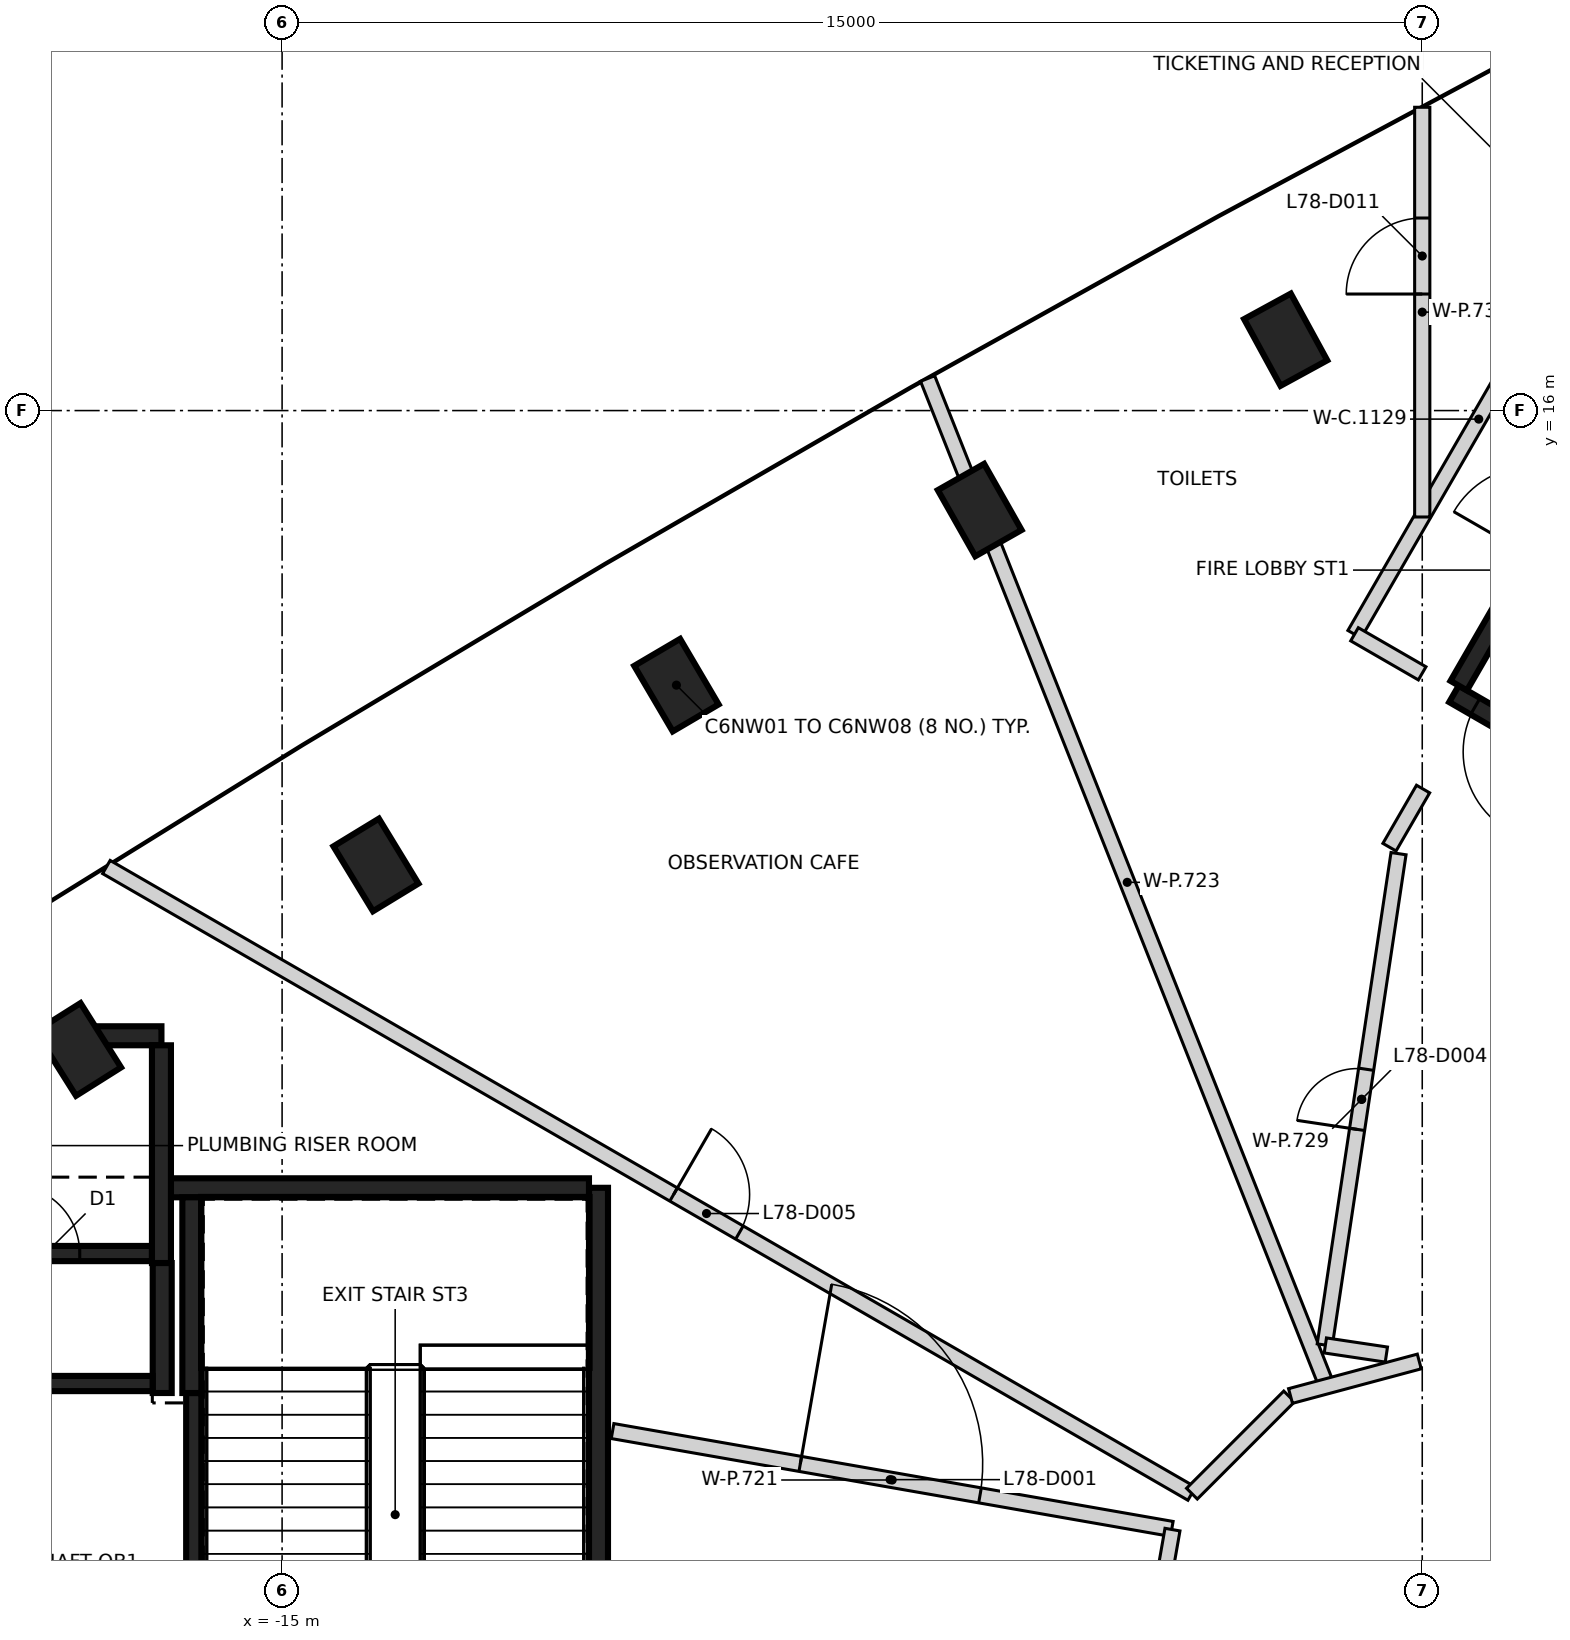
"""IFC4 building model, lengths in metres.
Left out: names, types, materials, properties, quantities, classifications, styles, units other than length and angle.
Written with IfcOpenShell. Run it as: python <this file> out.ifc"""

import sys

from ifc_helpers import new_model, si_unit, direction, frame, frame_2d, origin, origin_2d, place, context, subcontext, project, spatial, rectangle, extrude, element, fill, save


model = new_model("IFC4")
c1 = context("Model", 3, precision=1e-05, world=origin(), true_north=direction((0.0, 1.0)))
c2 = subcontext(c1, "Body", "Model", "MODEL_VIEW")
j1 = project(units=[si_unit("LENGTHUNIT", "METRE"), si_unit("PLANEANGLEUNIT", "RADIAN")], contexts=[c1])
p1 = place(None, origin())
s1 = spatial("IfcSite", under=j1, at=p1, CompositionType="ELEMENT")
p2 = place(p1, origin())
s2 = spatial("IfcBuilding", under=s1, at=p2, CompositionType="ELEMENT")
p3 = place(p2, frame((0.0, 0.0, 312.6)))
s3 = spatial("IfcBuildingStorey", under=s2, at=p3, CompositionType="ELEMENT", Elevation=312.6)
for number, where, z_axis, x_axis in (
    (1, (-1.797, 16.932, -0.35), (0.0, 0.0, 1.0), (-0.479, 0.878, 0.0)),
    (2, (-5.822, 14.691, -0.35), (0.0, 0.0, 1.0), (-0.493, 0.87, 0.0)),
    (3, (-9.812, 12.388, -0.35), (0.0, 0.0, 1.0), (-0.507, 0.862, 0.0)),
    (4, (-13.765, 10.022, -0.35), (0.0, 0.0, 1.0), (-0.52, 0.854, 0.0)),
    (5, (-17.681, 7.595, -0.35), (0.0, 0.0, 1.0), (-0.533, 0.846, 0.0)),
):
    element("IfcColumn", number, at=place(p3, frame(where, z_axis=z_axis, x_axis=x_axis)), inside=s3, PredefinedType="COLUMN", context=c2, shape_type="SweptSolid", body=[
        extrude(rectangle(XDim=1.0, YDim=0.7, at=origin_2d()), origin(), (0.0, 0.0, 1.0), 8.1),
    ])
p4 = place(p3, frame((-10.837, 5.775, 0.0), z_axis=(0.0, 0.0, 1.0), x_axis=(0.0, -1.0, 0.0)))
e6 = element("IfcWall", 6, at=p4, inside=s3, PredefinedType="SHEAR", context=c2, shape_type="SweptSolid", body=[
    extrude(rectangle(XDim=11.55, YDim=0.25, at=frame_2d((5.775, 0.0))), origin(), (0.0, 0.0, 1.0), 7.75),
])
p5 = place(p4, frame((10.025, 0.0, 0.0)))
e7 = element("IfcOpeningElement", 7, at=p5, cuts=e6, PredefinedType="OPENING", context=c2, shape_type="SweptSolid", body=[
    extrude(rectangle(XDim=1.2, YDim=2.1, at=frame_2d((0.6, 1.05))), frame((0.0, 0.135, 0.0), z_axis=(0.0, -1.0, 0.0), x_axis=(1.0, 0.0, 0.0)), (0.0, 0.0, 1.0), 0.27),
])
p6 = place(p4, frame((8.725, 0.0, 0.0)))
e8 = element("IfcOpeningElement", 8, at=p6, cuts=e6, PredefinedType="OPENING", context=c2, shape_type="SweptSolid", body=[
    extrude(rectangle(XDim=1.2, YDim=2.1, at=frame_2d((0.6, 1.05))), frame((0.0, 0.135, 0.0), z_axis=(0.0, -1.0, 0.0), x_axis=(1.0, 0.0, 0.0)), (0.0, 0.0, 1.0), 0.27),
])
p7 = place(p3, frame((-16.472, 5.775, 0.0), z_axis=(0.0, 0.0, 1.0), x_axis=(1.0, 0.0, 0.0)))
e9 = element("IfcWall", 9, at=p7, inside=s3, PredefinedType="SHEAR", context=c2, shape_type="SweptSolid", body=[
    extrude(rectangle(XDim=5.51, YDim=0.25, at=frame_2d((2.755, 0.0))), origin(), (0.0, 0.0, 1.0), 7.75),
])
p8 = place(p3, frame((-19.637, 7.775, 0.0), z_axis=(0.0, 0.0, 1.0), x_axis=(1.0, 0.0, 0.0)))
e10 = element("IfcWall", 10, at=p8, inside=s3, PredefinedType="SHEAR", context=c2, shape_type="SweptSolid", body=[
    extrude(rectangle(XDim=3.05, YDim=0.25, at=frame_2d((1.525, 0.0))), origin(), (0.0, 0.0, 1.0), 7.75),
])
p9 = place(p3, frame((-16.587, 7.65, 0.0), z_axis=(0.0, 0.0, 1.0), x_axis=(0.0, -1.0, 0.0)))
e11 = element("IfcWall", 11, at=p9, inside=s3, PredefinedType="SHEAR", context=c2, shape_type="SweptSolid", body=[
    extrude(rectangle(XDim=2.865, YDim=0.25, at=frame_2d((1.432, 0.0))), origin(), (0.0, 0.0, 1.0), 7.75),
])
p10 = place(p3, frame((-16.187, 3.075, 0.0), z_axis=(0.0, 0.0, 1.0), x_axis=(0.0, 1.0, 0.0)))
e12 = element("IfcWall", 12, at=p10, inside=s3, PredefinedType="SHEAR", context=c2, shape_type="SweptSolid", body=[
    extrude(rectangle(XDim=2.575, YDim=0.25, at=frame_2d((1.287, 0.0))), origin(), (0.0, 0.0, 1.0), 7.75),
])
p11 = place(p3, frame((-16.577, 4.785, 0.0), z_axis=(0.0, 0.0, 1.0), x_axis=(0.0, -1.0, 0.0)))
e13 = element("IfcWall", 13, at=p11, inside=s3, PredefinedType="SHEAR", context=c2, shape_type="SweptSolid", body=[
    extrude(rectangle(XDim=1.71, YDim=0.25, at=frame_2d((0.855, 0.0))), origin(), (0.0, 0.0, 1.0), 7.75),
])
p12 = place(p3, frame((-16.162, 3.074, 0.0), z_axis=(0.0, 0.0, 1.0), x_axis=(0.0, -1.0, 0.0)))
e14 = element("IfcWall", 14, at=p12, inside=s3, PredefinedType="SHEAR", context=c2, shape_type="SweptSolid", body=[
    extrude(rectangle(XDim=5.974, YDim=0.2, at=frame_2d((2.987, 0.0))), origin(), (0.0, 0.0, 1.0), 7.75),
])
p13 = place(p3, frame((-19.511, 4.91, 0.0), z_axis=(0.0, 0.0, 1.0), x_axis=(1.0, 0.0, 0.0)))
e15 = element("IfcWall", 15, at=p13, inside=s3, PredefinedType="SHEAR", context=c2, shape_type="SweptSolid", body=[
    extrude(rectangle(XDim=2.798, YDim=0.2, at=frame_2d((1.399, 0.0))), origin(), (0.0, 0.0, 1.0), 7.75),
])
p14 = place(p13, frame((0.949, 0.0, 0.0)))
e16 = element("IfcOpeningElement", 16, at=p14, cuts=e15, PredefinedType="OPENING", context=c2, shape_type="SweptSolid", body=[
    extrude(rectangle(XDim=0.9, YDim=2.1, at=frame_2d((0.45, 1.05))), frame((0.0, 0.11, 0.0), z_axis=(0.0, -1.0, 0.0), x_axis=(1.0, 0.0, 0.0)), (0.0, 0.0, 1.0), 0.22),
])
p15 = place(p3, frame((-19.462, 3.2, 0.0), z_axis=(0.0, 0.0, 1.0), x_axis=(1.0, 0.0, 0.0)))
e17 = element("IfcWall", 17, at=p15, inside=s3, PredefinedType="SHEAR", context=c2, shape_type="SweptSolid", body=[
    extrude(rectangle(XDim=2.759, YDim=0.2, at=frame_2d((1.379, 0.0))), origin(), (0.0, 0.0, 1.0), 7.75),
])
p16 = place(p3, frame((10.42, 6.498, 0.0), z_axis=(0.0, 0.0, 1.0), x_axis=(-0.866021906294, 0.500006057782, 0.0)))
e18 = element("IfcWall", 18, at=p16, inside=s3, PredefinedType="SHEAR", context=c2, shape_type="SweptSolid", body=[
    extrude(rectangle(XDim=11.55, YDim=0.25, at=frame_2d((5.775, 0.0))), origin(), (0.0, 0.0, 1.0), 7.75),
])
p17 = place(p16, frame((10.025, 0.0, 0.0)))
e19 = element("IfcOpeningElement", 19, at=p17, cuts=e18, PredefinedType="OPENING", context=c2, shape_type="SweptSolid", body=[
    extrude(rectangle(XDim=1.2, YDim=2.1, at=frame_2d((0.6, 1.05))), frame((0.0, 0.135, 0.0), z_axis=(0.0, -1.0, 0.0), x_axis=(1.0, 0.0, 0.0)), (0.0, 0.0, 1.0), 0.27),
])
p18 = place(p16, frame((8.725, 0.0, 0.0)))
e20 = element("IfcOpeningElement", 20, at=p18, cuts=e18, PredefinedType="OPENING", context=c2, shape_type="SweptSolid", body=[
    extrude(rectangle(XDim=1.2, YDim=2.1, at=frame_2d((0.6, 1.05))), frame((0.0, 0.135, 0.0), z_axis=(0.0, -1.0, 0.0), x_axis=(1.0, 0.0, 0.0)), (0.0, 0.0, 1.0), 0.27),
])
p19 = place(p3, frame((0.48, 12.381, 0.0), z_axis=(0.0, 0.0, 1.0), x_axis=(0.49999885962, 0.866026062182, 0.0)))
e21 = element("IfcWall", 21, at=p19, inside=s3, PredefinedType="SHEAR", context=c2, shape_type="SweptSolid", body=[
    extrude(rectangle(XDim=5.225, YDim=0.25, at=frame_2d((2.612, 0.0))), origin(), (0.0, 0.0, 1.0), 7.75),
])
p20 = place(p19, frame((1.949, 0.0, 0.0)))
e22 = element("IfcOpeningElement", 22, at=p20, cuts=e21, PredefinedType="OPENING", context=c2, shape_type="SweptSolid", body=[
    extrude(rectangle(XDim=1.2, YDim=2.1, at=frame_2d((0.6, 1.05))), frame((0.0, 0.135, 0.0), z_axis=(0.0, -1.0, 0.0), x_axis=(1.0, 0.0, 0.0)), (0.0, 0.0, 1.0), 0.27),
])
p21 = place(p3, frame((-0.891, 13.057, 0.0), z_axis=(0.0, 0.0, 1.0), x_axis=(0.500039268703, 0.866002730801, 0.0)))
e23 = element("IfcWall", 23, at=p21, inside=s3, PredefinedType="PARTITIONING", context=c2, shape_type="SweptSolid", body=[
    extrude(rectangle(XDim=6.537, YDim=0.2, at=frame_2d((3.269, 0.0))), origin(), (0.0, 0.0, 1.0), 7.75),
])
p22 = place(p3, frame((-0.891, 13.057, 0.0), z_axis=(0.0, 0.0, 1.0), x_axis=(0.866027366358, -0.499996600708, 0.0)))
e24 = element("IfcWall", 24, at=p22, inside=s3, PredefinedType="PARTITIONING", context=c2, shape_type="SweptSolid", body=[
    extrude(rectangle(XDim=1.028, YDim=0.2, at=frame_2d((0.514, 0.0))), origin(), (0.0, 0.0, 1.0), 7.75),
])
p23 = place(p3, frame((-17.312, 9.995, 0.0), z_axis=(0.0, 0.0, 1.0), x_axis=(0.866015691277, -0.500016822178, 0.0)))
e25 = element("IfcWall", 25, at=p23, inside=s3, PredefinedType="PARTITIONING", context=c2, shape_type="SweptSolid", body=[
    extrude(rectangle(XDim=16.488, YDim=0.2, at=frame_2d((8.244, 0.0))), origin(), (0.0, 0.0, 1.0), 7.75),
])
p24 = place(p23, frame((8.617, 0.0, 0.0)))
e26 = element("IfcOpeningElement", 26, at=p24, cuts=e25, PredefinedType="OPENING", context=c2, shape_type="SweptSolid", body=[
    extrude(rectangle(XDim=1.0, YDim=2.1, at=frame_2d((0.5, 1.05))), frame((0.0, 0.11, 0.0), z_axis=(0.0, -1.0, 0.0), x_axis=(1.0, 0.0, 0.0)), (0.0, 0.0, 1.0), 0.22),
])
p25 = place(p3, frame((-10.652, 2.575, 0.0), z_axis=(0.0, 0.0, 1.0), x_axis=(0.985029357115, -0.172386674722, 0.0)))
e27 = element("IfcWall", 27, at=p25, inside=s3, PredefinedType="PARTITIONING", context=c2, shape_type="SweptSolid", body=[
    extrude(rectangle(XDim=7.469, YDim=0.2, at=frame_2d((3.735, 0.0))), origin(), (0.0, 0.0, 1.0), 7.75),
])
p26 = place(p25, frame((2.507, 0.0, 0.0)))
e28 = element("IfcOpeningElement", 28, at=p26, cuts=e27, PredefinedType="OPENING", context=c2, shape_type="SweptSolid", body=[
    extrude(rectangle(XDim=2.4, YDim=2.1, at=frame_2d((1.2, 1.05))), frame((0.0, 0.11, 0.0), z_axis=(0.0, -1.0, 0.0), x_axis=(1.0, 0.0, 0.0)), (0.0, 0.0, 1.0), 0.22),
])
p27 = place(p3, frame((-6.507, 16.421, 0.0), z_axis=(0.0, 0.0, 1.0), x_axis=(0.368383356077, -0.929673976706, 0.0)))
e29 = element("IfcWall", 29, at=p27, inside=s3, PredefinedType="PARTITIONING", context=c2, shape_type="SweptSolid", body=[
    extrude(rectangle(XDim=14.258, YDim=0.2, at=frame_2d((7.129, 0.0))), origin(), (0.0, 0.0, 1.0), 7.75),
])
p28 = place(p3, frame((-3.453, 0.325, 0.0), z_axis=(0.0, 0.0, 1.0), x_axis=(0.172576174049, 0.984996174688, 0.0)))
e30 = element("IfcWall", 30, at=p28, inside=s3, PredefinedType="PARTITIONING", context=c2, shape_type="SweptSolid", body=[
    extrude(rectangle(XDim=0.968, YDim=0.2, at=frame_2d((0.484, 0.0))), origin(), (0.0, 0.0, 1.0), 7.75),
])
p29 = place(p3, frame((-3.03, 1.751, 0.0), z_axis=(0.0, 0.0, 1.0), x_axis=(0.707106781187, 0.707106781187, 0.0)))
e31 = element("IfcWall", 31, at=p29, inside=s3, PredefinedType="PARTITIONING", context=c2, shape_type="SweptSolid", body=[
    extrude(rectangle(XDim=1.809, YDim=0.2, at=frame_2d((0.904, 0.0))), origin(), (0.0, 0.0, 1.0), 7.75),
])
p30 = place(p3, frame((-1.733, 3.036, 0.0), z_axis=(0.0, 0.0, 1.0), x_axis=(0.96589210992, 0.258944843536, 0.0)))
e32 = element("IfcWall", 32, at=p30, inside=s3, PredefinedType="PARTITIONING", context=c2, shape_type="SweptSolid", body=[
    extrude(rectangle(XDim=1.754, YDim=0.2, at=frame_2d((0.877, 0.0))), origin(), (0.0, 0.0, 1.0), 7.75),
])
p31 = place(p3, frame((-1.283, 3.707, 0.0), z_axis=(0.0, 0.0, 1.0), x_axis=(0.148545012809, 0.988905647253, 0.0)))
e33 = element("IfcWall", 33, at=p31, inside=s3, PredefinedType="PARTITIONING", context=c2, shape_type="SweptSolid", body=[
    extrude(rectangle(XDim=6.536, YDim=0.2, at=frame_2d((3.268, 0.0))), origin(), (0.0, 0.0, 1.0), 7.75),
])
p32 = place(p31, frame((2.868, 0.0, 0.0)))
e34 = element("IfcOpeningElement", 34, at=p32, cuts=e33, PredefinedType="OPENING", context=c2, shape_type="SweptSolid", body=[
    extrude(rectangle(XDim=0.8, YDim=2.1, at=frame_2d((0.4, 1.05))), frame((0.0, 0.11, 0.0), z_axis=(0.0, -1.0, 0.0), x_axis=(1.0, 0.0, 0.0)), (0.0, 0.0, 1.0), 0.22),
])
p33 = place(p3, frame((-1.275, 3.701, 0.0), z_axis=(0.0, 0.0, 1.0), x_axis=(0.989039779604, -0.147649295161, 0.0)))
e35 = element("IfcWall", 35, at=p33, inside=s3, PredefinedType="PARTITIONING", context=c2, shape_type="SweptSolid", body=[
    extrude(rectangle(XDim=0.812, YDim=0.2, at=frame_2d((0.406, 0.0))), origin(), (0.0, 0.0, 1.0), 7.75),
])
p34 = place(p3, frame((-0.431, 10.256, 0.0), z_axis=(0.0, 0.0, 1.0), x_axis=(0.500240760917, 0.865886355775, 0.0)))
e36 = element("IfcWall", 36, at=p34, inside=s3, PredefinedType="PARTITIONING", context=c2, shape_type="SweptSolid", body=[
    extrude(rectangle(XDim=0.883, YDim=0.2, at=frame_2d((0.442, 0.0))), origin(), (0.0, 0.0, 1.0), 7.75),
])
p35 = place(p3, frame((0.0, 14.6, 0.0), z_axis=(0.0, 0.0, 1.0), x_axis=(0.0, 1.0, 0.0)))
e37 = element("IfcWall", 37, at=p35, inside=s3, PredefinedType="PARTITIONING", context=c2, shape_type="SweptSolid", body=[
    extrude(rectangle(XDim=5.39, YDim=0.2, at=frame_2d((2.695, 0.0))), origin(), (0.0, 0.0, 1.0), 7.75),
])
p36 = place(p35, frame((2.933, 0.0, 0.0)))
e38 = element("IfcOpeningElement", 38, at=p36, cuts=e37, PredefinedType="OPENING", context=c2, shape_type="SweptSolid", body=[
    extrude(rectangle(XDim=1.0, YDim=2.1, at=frame_2d((0.5, 1.05))), frame((0.0, 0.11, 0.0), z_axis=(0.0, -1.0, 0.0), x_axis=(1.0, 0.0, 0.0)), (0.0, 0.0, 1.0), 0.22),
])
p37 = place(p14, origin())
e39 = element("IfcDoor", 39, at=p37, inside=s3, OperationType="SINGLE_SWING_RIGHT", PredefinedType="DOOR", context=c2, shape_type="SweptSolid", body=[
    extrude(rectangle(XDim=0.9, YDim=2.1, at=frame_2d((0.45, 1.05))), frame((0.0, 0.025, 0.0), z_axis=(0.0, -1.0, 0.0), x_axis=(1.0, 0.0, 0.0)), (0.0, 0.0, 1.0), 0.05),
])
fill(e16, e39)
p38 = place(p17, origin())
e40 = element("IfcDoor", 40, at=p38, inside=s3, OperationType="SINGLE_SWING_LEFT", PredefinedType="DOOR", context=c2, shape_type="SweptSolid", body=[
    extrude(rectangle(XDim=1.2, YDim=2.1, at=frame_2d((0.6, 1.05))), frame((0.0, 0.025, 0.0), z_axis=(0.0, -1.0, 0.0), x_axis=(1.0, 0.0, 0.0)), (0.0, 0.0, 1.0), 0.05),
])
fill(e19, e40)
p39 = place(p26, origin())
e41 = element("IfcDoor", 41, at=p39, inside=s3, OperationType="DOUBLE_DOOR_SINGLE_SWING", PredefinedType="DOOR", context=c2, shape_type="SweptSolid", body=[
    extrude(rectangle(XDim=2.4, YDim=2.1, at=frame_2d((1.2, 1.05))), frame((0.0, 0.025, 0.0), z_axis=(0.0, -1.0, 0.0), x_axis=(1.0, 0.0, 0.0)), (0.0, 0.0, 1.0), 0.05),
])
fill(e28, e41)
p40 = place(p32, origin())
e42 = element("IfcDoor", 42, at=p40, inside=s3, OperationType="SINGLE_SWING_LEFT", PredefinedType="DOOR", context=c2, shape_type="SweptSolid", body=[
    extrude(rectangle(XDim=0.8, YDim=2.1, at=frame_2d((0.4, 1.05))), frame((0.0, 0.025, 0.0), z_axis=(0.0, -1.0, 0.0), x_axis=(1.0, 0.0, 0.0)), (0.0, 0.0, 1.0), 0.05),
])
fill(e34, e42)
p41 = place(p24, origin())
e43 = element("IfcDoor", 43, at=p41, inside=s3, OperationType="SINGLE_SWING_LEFT", PredefinedType="DOOR", context=c2, shape_type="SweptSolid", body=[
    extrude(rectangle(XDim=1.0, YDim=2.1, at=frame_2d((0.5, 1.05))), frame((0.0, 0.025, 0.0), z_axis=(0.0, -1.0, 0.0), x_axis=(1.0, 0.0, 0.0)), (0.0, 0.0, 1.0), 0.05),
])
fill(e26, e43)
p42 = place(p36, frame((1.0, 0.0, 0.0), z_axis=(0.0, 0.0, 1.0), x_axis=(-1.0, 0.0, 0.0)))
e44 = element("IfcDoor", 44, at=p42, inside=s3, OperationType="SINGLE_SWING_LEFT", PredefinedType="DOOR", context=c2, shape_type="SweptSolid", body=[
    extrude(rectangle(XDim=1.0, YDim=2.1, at=frame_2d((0.5, 1.05))), frame((0.0, 0.025, 0.0), z_axis=(0.0, -1.0, 0.0), x_axis=(1.0, 0.0, 0.0)), (0.0, 0.0, 1.0), 0.05),
])
fill(e38, e44)
save(model, sys.argv[1])
